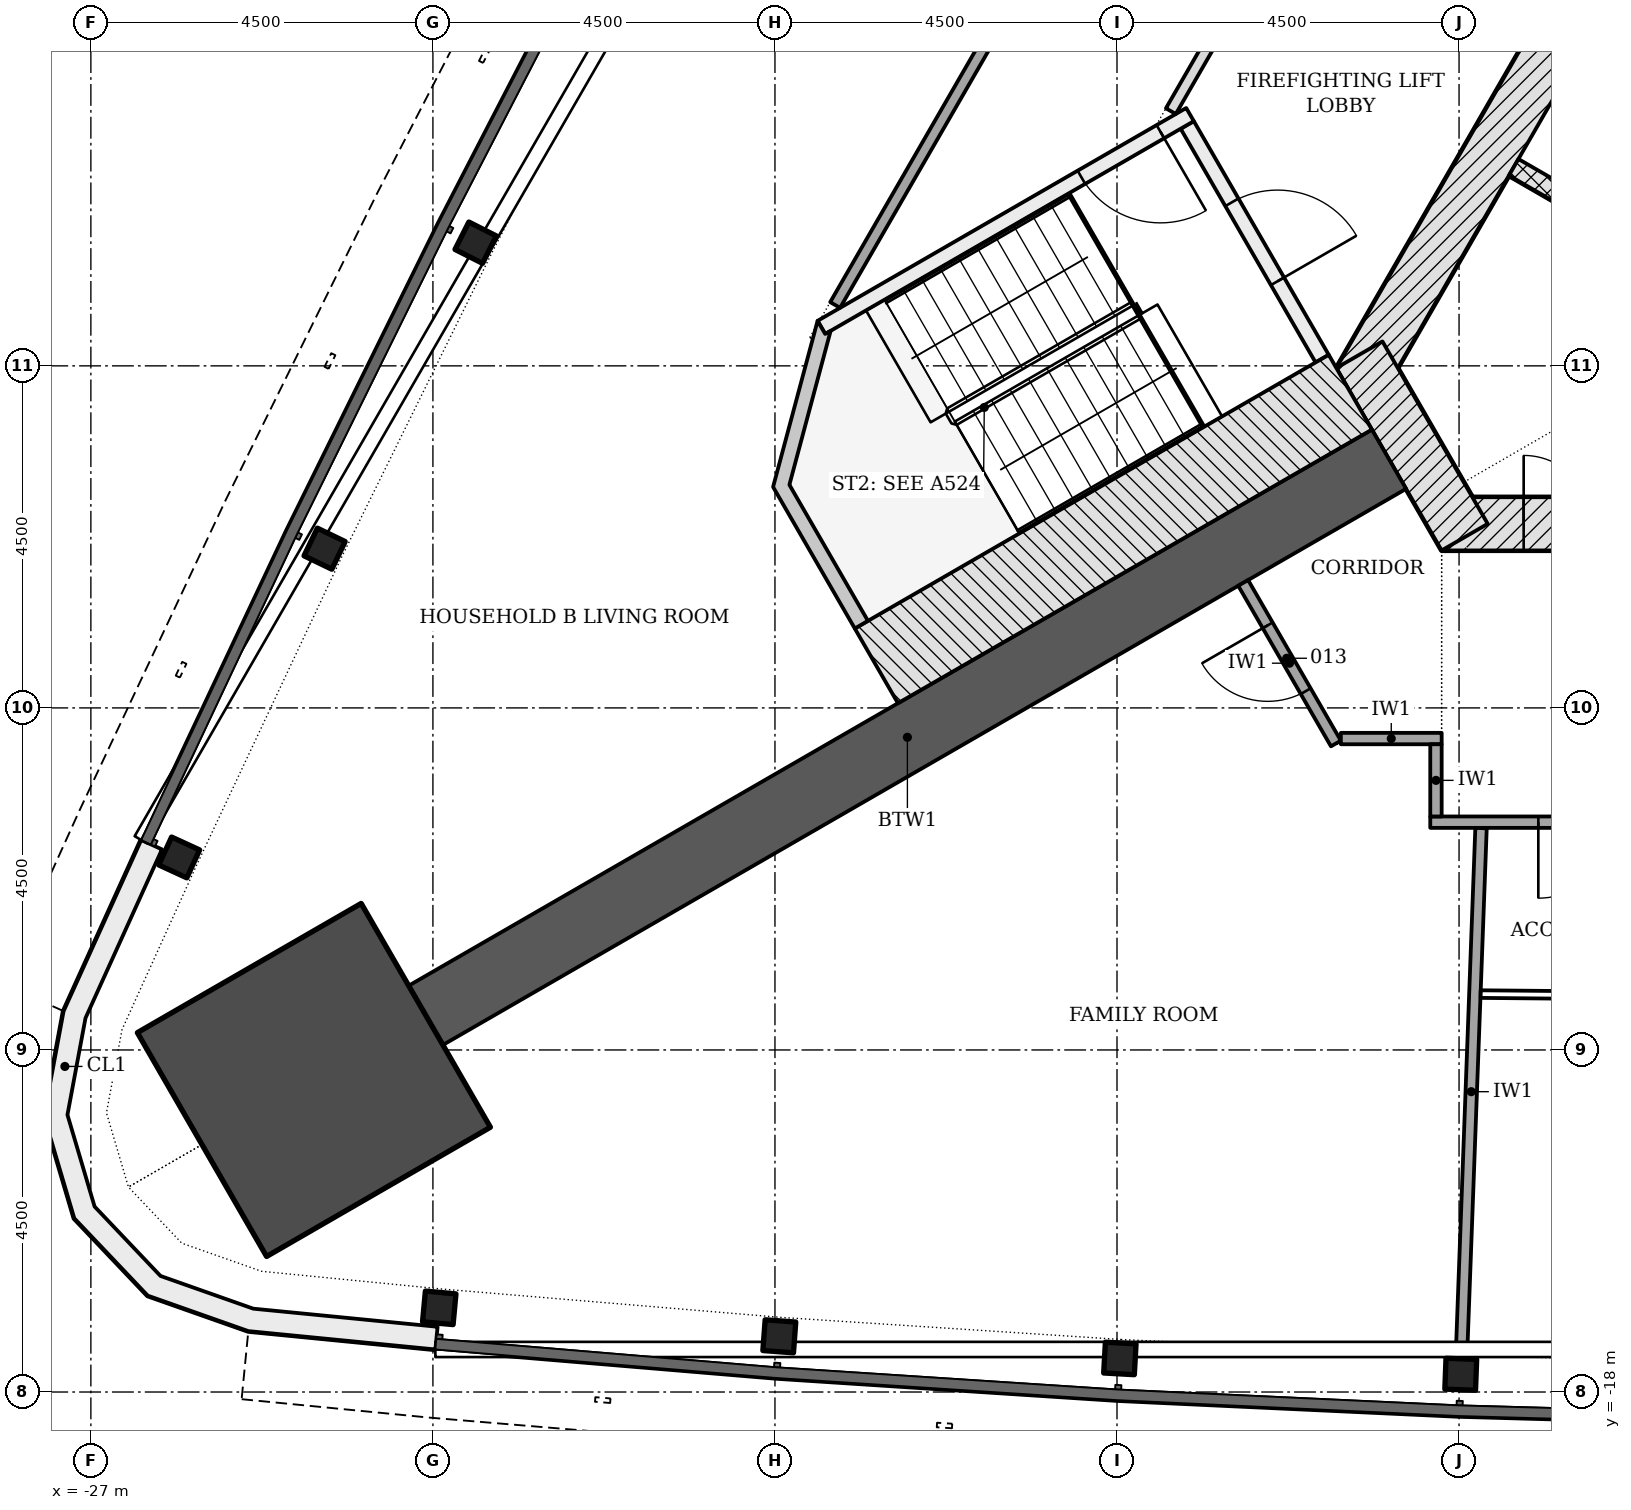
"""IFC4 building model, lengths in metres.
Left out: names, types, materials, properties, quantities, classifications, styles, units other than length and angle.
Written with IfcOpenShell. Run it as: python <this file> out.ifc"""

import sys

from ifc_helpers import new_model, si_unit, direction, frame, frame_2d, origin, origin_2d, place, context, subcontext, project, spatial, polyline, rectangle, i_section, outline, extrude, element, fill, save


model = new_model("IFC4")
c1 = context("Model", 3, precision=1e-05, world=origin(), true_north=direction((0.0, 1.0)))
c2 = subcontext(c1, "Body", "Model", "MODEL_VIEW")
j1 = project(units=[si_unit("LENGTHUNIT", "METRE"), si_unit("PLANEANGLEUNIT", "RADIAN")], contexts=[c1])
p1 = place(None, origin())
s1 = spatial("IfcSite", under=j1, at=p1, CompositionType="ELEMENT")
p2 = place(p1, origin())
s2 = spatial("IfcBuilding", under=s1, at=p2, CompositionType="ELEMENT")
p3 = place(p2, frame((0.0, 0.0, 27.6)))
s3 = spatial("IfcBuildingStorey", under=s2, at=p3, CompositionType="ELEMENT", Elevation=27.6)
p4 = place(p3, frame((-9.229, -6.578, -0.2), z_axis=(0.0, 0.0, 1.0), x_axis=(1.0, 0.0, 0.0)))
e1 = element("IfcWall", 1, at=p4, inside=s3, PredefinedType="SHEAR", context=c2, shape_type="SweptSolid", body=[
    extrude(rectangle(XDim=18.458, YDim=0.7, at=frame_2d((9.229, 0.0))), origin(), (0.0, 0.0, 1.0), 3.6),
])
p5 = place(p4, frame((3.304, 0.0, 0.2)))
e2 = element("IfcOpeningElement", 2, at=p5, cuts=e1, PredefinedType="OPENING", context=c2, shape_type="SweptSolid", body=[
    extrude(rectangle(XDim=1.1, YDim=2.1, at=frame_2d((0.55, 1.05))), frame((0.0, 0.36, 0.0), z_axis=(0.0, -1.0, 0.0), x_axis=(1.0, 0.0, 0.0)), (0.0, 0.0, 1.0), 0.72),
])
p6 = place(p4, frame((5.454, 0.0, 0.2)))
e3 = element("IfcOpeningElement", 3, at=p6, cuts=e1, PredefinedType="OPENING", context=c2, shape_type="SweptSolid", body=[
    extrude(rectangle(XDim=1.1, YDim=2.1, at=frame_2d((0.55, 1.05))), frame((0.0, 0.36, 0.0), z_axis=(0.0, -1.0, 0.0), x_axis=(1.0, 0.0, 0.0)), (0.0, 0.0, 1.0), 0.72),
])
p7 = place(p4, frame((7.604, 0.0, 0.2)))
e4 = element("IfcOpeningElement", 4, at=p7, cuts=e1, PredefinedType="OPENING", context=c2, shape_type="SweptSolid", body=[
    extrude(rectangle(XDim=1.1, YDim=2.1, at=frame_2d((0.55, 1.05))), frame((0.0, 0.36, 0.0), z_axis=(0.0, -1.0, 0.0), x_axis=(1.0, 0.0, 0.0)), (0.0, 0.0, 1.0), 0.72),
])
p8 = place(p4, frame((9.754, 0.0, 0.2)))
e5 = element("IfcOpeningElement", 5, at=p8, cuts=e1, PredefinedType="OPENING", context=c2, shape_type="SweptSolid", body=[
    extrude(rectangle(XDim=1.1, YDim=2.1, at=frame_2d((0.55, 1.05))), frame((0.0, 0.36, 0.0), z_axis=(0.0, -1.0, 0.0), x_axis=(1.0, 0.0, 0.0)), (0.0, 0.0, 1.0), 0.72),
])
p9 = place(p4, frame((11.904, 0.0, 0.2)))
e6 = element("IfcOpeningElement", 6, at=p9, cuts=e1, PredefinedType="OPENING", context=c2, shape_type="SweptSolid", body=[
    extrude(rectangle(XDim=1.1, YDim=2.1, at=frame_2d((0.55, 1.05))), frame((0.0, 0.36, 0.0), z_axis=(0.0, -1.0, 0.0), x_axis=(1.0, 0.0, 0.0)), (0.0, 0.0, 1.0), 0.72),
])
p10 = place(p4, frame((14.054, 0.0, 0.2)))
e7 = element("IfcOpeningElement", 7, at=p10, cuts=e1, PredefinedType="OPENING", context=c2, shape_type="SweptSolid", body=[
    extrude(rectangle(XDim=1.1, YDim=2.1, at=frame_2d((0.55, 1.05))), frame((0.0, 0.36, 0.0), z_axis=(0.0, -1.0, 0.0), x_axis=(1.0, 0.0, 0.0)), (0.0, 0.0, 1.0), 0.72),
])
p11 = place(p4, frame((1.079, 0.0, 0.2)))
e8 = element("IfcOpeningElement", 8, at=p11, cuts=e1, PredefinedType="OPENING", context=c2, shape_type="SweptSolid", body=[
    extrude(rectangle(XDim=0.9, YDim=2.1, at=frame_2d((0.45, 1.05))), frame((0.0, 0.36, 0.0), z_axis=(0.0, -1.0, 0.0), x_axis=(1.0, 0.0, 0.0)), (0.0, 0.0, 1.0), 0.72),
])
p12 = place(p3, frame((-1.083, 11.281, -0.2), z_axis=(0.0, 0.0, 1.0), x_axis=(-0.500001446645, -0.866024568562, 0.0)))
e9 = element("IfcWall", 9, at=p12, inside=s3, PredefinedType="SHEAR", context=c2, shape_type="SweptSolid", body=[
    extrude(rectangle(XDim=18.458, YDim=0.7, at=frame_2d((9.229, 0.0))), origin(), (0.0, 0.0, 1.0), 3.6),
])
p13 = place(p12, frame((8.979, 0.0, 0.2)))
e10 = element("IfcOpeningElement", 10, at=p13, cuts=e9, PredefinedType="OPENING", context=c2, shape_type="SweptSolid", body=[
    extrude(rectangle(XDim=1.2, YDim=2.1, at=frame_2d((0.6, 1.05))), frame((0.0, 0.36, 0.0), z_axis=(0.0, -1.0, 0.0), x_axis=(1.0, 0.0, 0.0)), (0.0, 0.0, 1.0), 0.72),
])
p14 = place(p12, frame((11.029, 0.0, 0.2)))
e11 = element("IfcOpeningElement", 11, at=p14, cuts=e9, PredefinedType="OPENING", context=c2, shape_type="SweptSolid", body=[
    extrude(rectangle(XDim=1.2, YDim=2.1, at=frame_2d((0.6, 1.05))), frame((0.0, 0.36, 0.0), z_axis=(0.0, -1.0, 0.0), x_axis=(1.0, 0.0, 0.0)), (0.0, 0.0, 1.0), 0.72),
])
p15 = place(p3, frame((-10.311, -4.353, -0.2), z_axis=(0.0, 0.0, 1.0), x_axis=(0.500042739161, -0.866000726912, 0.0)))
e12 = element("IfcWall", 12, at=p15, inside=s3, PredefinedType="SHEAR", context=c2, shape_type="SweptSolid", body=[
    extrude(rectangle(XDim=2.771, YDim=0.7, at=frame_2d((1.386, 0.0))), origin(), (0.0, 0.0, 1.0), 3.6),
])
p16 = place(p3, frame((-9.922, -5.728, -0.2), z_axis=(0.0, 0.0, 1.0), x_axis=(-0.866028046028, -0.499995423472, 0.0)))
e13 = element("IfcWall", 13, at=p16, inside=s3, PredefinedType="SHEAR", context=c2, shape_type="SweptSolid", body=[
    extrude(rectangle(XDim=14.633, YDim=0.9, at=frame_2d((7.316, 0.0))), origin(), (0.0, 0.0, 1.0), 3.6),
])
p17 = place(p3, frame((-24.066, -13.895, -0.2), z_axis=(0.0, 0.0, 1.0), x_axis=(-0.866025403784, -0.5, 0.0)))
e14 = element("IfcColumn", 14, at=p17, inside=s3, PredefinedType="COLUMN", context=c2, shape_type="SweptSolid", body=[
    extrude(rectangle(XDim=3.4, YDim=3.4, at=origin_2d()), origin(), (0.0, 0.0, 1.0), 3.6),
])
for number, where, z_axis, x_axis in (
    (15, (-21.937, -2.88, -0.2), (0.0, 0.0, 1.0), (-0.451, -0.893, 0.0)),
    (16, (-23.925, -6.905, -0.2), (0.0, 0.0, 1.0), (-0.434, -0.901, 0.0)),
    (17, (-25.838, -10.967, -0.2), (0.0, 0.0, 1.0), (-0.418, -0.909, 0.0)),
    (18, (-22.417, -16.893, -0.2), (0.0, 0.0, 1.0), (0.996, -0.093, 0.0)),
    (19, (-17.943, -17.267, -0.2), (0.0, 0.0, 1.0), (0.997, -0.074, 0.0)),
    (20, (-13.462, -17.558, -0.2), (0.0, 0.0, 1.0), (0.998, -0.056, 0.0)),
    (21, (-8.978, -17.767, -0.2), (0.0, 0.0, 1.0), (0.999, -0.037, 0.0)),
):
    element("IfcColumn", number, at=place(p3, frame(where, z_axis=z_axis, x_axis=x_axis)), inside=s3, PredefinedType="COLUMN", context=c2, shape_type="SweptSolid", body=[
        extrude(i_section(OverallWidth=0.404, OverallDepth=0.406, WebThickness=0.027, FlangeThickness=0.044, FilletRadius=0.015, at=origin_2d()), origin(), (0.0, 0.0, 1.0), 3.6),
    ])
p18 = place(p3, origin())
e22 = element("IfcWall", 22, at=p18, inside=s3, PredefinedType="NOTDEFINED", context=c2, shape_type="SweptSolid", body=[
    extrude(outline(polyline([(-26.338, -10.738), (-27.359, -12.99), (-27.616, -14.369), (-27.218, -15.715), (-26.252, -16.732), (-24.929, -17.199), (-22.468, -17.44), (-22.438, -17.142), (-24.863, -16.904), (-26.084, -16.473), (-26.951, -15.56), (-27.308, -14.353), (-27.071, -13.08), (-26.064, -10.861), (-26.338, -10.738)])), origin(), (0.0, 0.0, 1.0), 3.3),
])
p19 = place(p3, frame((-8.281, -1.887, -0.2), z_axis=(0.0, 0.0, 1.0), x_axis=(0.866032775405, -0.499987231761, 0.0)))
e23 = element("IfcWall", 23, at=p19, inside=s3, PredefinedType="PARTITIONING", context=c2, shape_type="SweptSolid", body=[
    extrude(rectangle(XDim=2.9, YDim=0.25, at=frame_2d((1.45, 0.0))), origin(), (0.0, 0.0, 1.0), 3.6),
])
p20 = place(p3, frame((-12.576, -1.331, -0.2), z_axis=(0.0, 0.0, 1.0), x_axis=(0.499970499736, -0.8660424351, 0.0)))
e24 = element("IfcWall", 24, at=p20, inside=s3, PredefinedType="SHEAR", context=c2, shape_type="SweptSolid", body=[
    extrude(rectangle(XDim=3.55, YDim=0.2, at=frame_2d((1.775, 0.0))), origin(), (0.0, 0.0, 1.0), 3.6),
])
p21 = place(p20, frame((1.175, 0.0, 0.2)))
e25 = element("IfcOpeningElement", 25, at=p21, cuts=e24, PredefinedType="OPENING", context=c2, shape_type="SweptSolid", body=[
    extrude(rectangle(XDim=1.2, YDim=2.1, at=frame_2d((0.6, 1.05))), frame((0.0, 0.11, 0.0), z_axis=(0.0, -1.0, 0.0), x_axis=(1.0, 0.0, 0.0)), (0.0, 0.0, 1.0), 0.22),
])
p22 = place(p3, frame((-12.539, -1.194, -0.2), z_axis=(0.0, 0.0, 1.0), x_axis=(-0.866045472092, -0.499965239061, 0.0)))
e26 = element("IfcWall", 26, at=p22, inside=s3, PredefinedType="SHEAR", context=c2, shape_type="SweptSolid", body=[
    extrude(rectangle(XDim=5.6, YDim=0.2, at=frame_2d((2.8, 0.0))), origin(), (0.0, 0.0, 1.0), 3.6),
])
p23 = place(p22, frame((0.45, 0.0, 0.2)))
e27 = element("IfcOpeningElement", 27, at=p23, cuts=e26, PredefinedType="OPENING", context=c2, shape_type="SweptSolid", body=[
    extrude(rectangle(XDim=1.2, YDim=2.1, at=frame_2d((0.6, 1.05))), frame((0.0, 0.11, 0.0), z_axis=(0.0, -1.0, 0.0), x_axis=(1.0, 0.0, 0.0)), (0.0, 0.0, 1.0), 0.22),
])
p24 = place(p3, frame((-10.43, -4.847, -0.2), z_axis=(0.0, 0.0, 1.0), x_axis=(-0.866018442252, -0.500012057535, 0.0)))
e28 = element("IfcWall", 28, at=p24, inside=s3, PredefinedType="SHEAR", context=c2, shape_type="SweptSolid", body=[
    extrude(rectangle(XDim=7.2, YDim=1.136, at=frame_2d((3.6, 0.0))), origin(), (0.0, 0.0, 1.0), 3.6),
])
p25 = place(p3, frame((0.0, 0.0, -0.2)))
e29 = element("IfcWall", 29, at=p25, inside=s3, PredefinedType="SHEAR", context=c2, shape_type="SweptSolid", body=[
    extrude(outline(polyline([(-17.439, -3.907), (-18.025, -6.093), (-16.95, -7.955), (-16.777, -7.855), (-17.81, -6.065), (-17.267, -4.039), (-17.339, -4.081), (-17.339, -4.081), (-17.339, -4.081), (-17.339, -4.081), (-17.339, -4.081), (-17.339, -4.081), (-17.339, -4.081), (-17.339, -4.081), (-17.339, -4.081), (-17.339, -4.081), (-17.339, -4.081), (-17.339, -4.081), (-17.339, -4.081), (-17.339, -4.081), (-17.339, -4.081), (-17.339, -4.081), (-17.339, -4.081), (-17.439, -3.907)])), origin(), (0.0, 0.0, 1.0), 3.6),
])
p26 = place(p3, frame((-17.208, -3.699, 0.0), z_axis=(0.0, 0.0, 1.0), x_axis=(0.499997567621, 0.866026808115, 0.0)))
e30 = element("IfcWall", 30, at=p26, inside=s3, PredefinedType="PARTITIONING", context=c2, shape_type="SweptSolid", body=[
    extrude(rectangle(XDim=23.736, YDim=0.15, at=frame_2d((11.868, 0.0))), origin(), (0.0, 0.0, 1.0), 2.768),
])
p27 = place(p26, frame((16.656, 0.0, 0.0)))
e31 = element("IfcOpeningElement", 31, at=p27, cuts=e30, PredefinedType="OPENING", context=c2, shape_type="SweptSolid", body=[
    extrude(rectangle(XDim=1.1, YDim=2.1, at=frame_2d((0.55, 1.05))), frame((0.0, 0.085, 0.0), z_axis=(0.0, -1.0, 0.0), x_axis=(1.0, 0.0, 0.0)), (0.0, 0.0, 1.0), 0.17),
])
p28 = place(p26, frame((14.662, 0.0, 0.0)))
e32 = element("IfcOpeningElement", 32, at=p28, cuts=e30, PredefinedType="OPENING", context=c2, shape_type="SweptSolid", body=[
    extrude(rectangle(XDim=1.1, YDim=2.1, at=frame_2d((0.55, 1.05))), frame((0.0, 0.085, 0.0), z_axis=(0.0, -1.0, 0.0), x_axis=(1.0, 0.0, 0.0)), (0.0, 0.0, 1.0), 0.17),
])
p29 = place(p26, frame((5.273, 0.0, 0.0)))
e33 = element("IfcOpeningElement", 33, at=p29, cuts=e30, PredefinedType="OPENING", context=c2, shape_type="SweptSolid", body=[
    extrude(rectangle(XDim=1.0, YDim=2.1, at=frame_2d((0.5, 1.05))), frame((0.0, 0.085, 0.0), z_axis=(0.0, -1.0, 0.0), x_axis=(1.0, 0.0, 0.0)), (0.0, 0.0, 1.0), 0.17),
])
p30 = place(p3, frame((-4.407, 13.374, 0.0), z_axis=(0.0, 0.0, 1.0), x_axis=(-0.499997181693, -0.866027030928, 0.0)))
e34 = element("IfcWall", 34, at=p30, inside=s3, PredefinedType="PARTITIONING", context=c2, shape_type="SweptSolid", body=[
    extrude(rectangle(XDim=16.77, YDim=0.15, at=frame_2d((8.385, 0.0))), origin(), (0.0, 0.0, 1.0), 2.768),
])
p31 = place(p30, frame((8.879, 0.0, 0.0)))
e35 = element("IfcOpeningElement", 35, at=p31, cuts=e34, PredefinedType="OPENING", context=c2, shape_type="SweptSolid", body=[
    extrude(rectangle(XDim=1.0, YDim=2.1, at=frame_2d((0.5, 1.05))), frame((0.0, 0.085, 0.0), z_axis=(0.0, -1.0, 0.0), x_axis=(1.0, 0.0, 0.0)), (0.0, 0.0, 1.0), 0.17),
])
p32 = place(p3, frame((3.689, -10.503, 0.0), z_axis=(0.0, 0.0, 1.0), x_axis=(-1.0, 0.0, 0.0)))
e36 = element("IfcWall", 36, at=p32, inside=s3, PredefinedType="PARTITIONING", context=c2, shape_type="SweptSolid", body=[
    extrude(rectangle(XDim=13.068, YDim=0.15, at=frame_2d((6.534, 0.0))), origin(), (0.0, 0.0, 1.0), 2.768),
])
p33 = place(p32, frame((10.646, 0.0, 0.0)))
e37 = element("IfcOpeningElement", 37, at=p33, cuts=e36, PredefinedType="OPENING", context=c2, shape_type="SweptSolid", body=[
    extrude(rectangle(XDim=1.0, YDim=2.1, at=frame_2d((0.5, 1.05))), frame((0.0, 0.085, 0.0), z_axis=(0.0, -1.0, 0.0), x_axis=(1.0, 0.0, 0.0)), (0.0, 0.0, 1.0), 0.17),
])
p34 = place(p32, frame((8.118, 0.0, 0.0)))
e38 = element("IfcOpeningElement", 38, at=p34, cuts=e36, PredefinedType="OPENING", context=c2, shape_type="SweptSolid", body=[
    extrude(rectangle(XDim=1.0, YDim=2.1, at=frame_2d((0.5, 1.05))), frame((0.0, 0.085, 0.0), z_axis=(0.0, -1.0, 0.0), x_axis=(1.0, 0.0, 0.0)), (0.0, 0.0, 1.0), 0.17),
])
p35 = place(p32, frame((2.986, 0.0, 0.0)))
e39 = element("IfcOpeningElement", 39, at=p35, cuts=e36, PredefinedType="OPENING", context=c2, shape_type="SweptSolid", body=[
    extrude(rectangle(XDim=1.5, YDim=2.1, at=frame_2d((0.75, 1.05))), frame((0.0, 0.085, 0.0), z_axis=(0.0, -1.0, 0.0), x_axis=(1.0, 0.0, 0.0)), (0.0, 0.0, 1.0), 0.17),
])
p36 = place(p3, frame((-10.62, -9.468, 0.0), z_axis=(0.0, 0.0, 1.0), x_axis=(-0.500045838785, 0.865998937132, 0.0)))
e40 = element("IfcWall", 40, at=p36, inside=s3, PredefinedType="PARTITIONING", context=c2, shape_type="SweptSolid", body=[
    extrude(rectangle(XDim=2.44, YDim=0.15, at=frame_2d((1.22, 0.0))), origin(), (0.0, 0.0, 1.0), 3.4),
])
p37 = place(p36, frame((0.795, 0.0, 0.0)))
e41 = element("IfcOpeningElement", 41, at=p37, cuts=e40, PredefinedType="OPENING", context=c2, shape_type="SweptSolid", body=[
    extrude(rectangle(XDim=1.0, YDim=2.1, at=frame_2d((0.5, 1.05))), frame((0.0, 0.085, 0.0), z_axis=(0.0, -1.0, 0.0), x_axis=(1.0, 0.0, 0.0)), (0.0, 0.0, 1.0), 0.17),
])
p38 = place(p3, frame((-10.555, -9.403, 0.0), z_axis=(0.0, 0.0, 1.0), x_axis=(1.0, 0.0, 0.0)))
e42 = element("IfcWall", 42, at=p38, inside=s3, PredefinedType="PARTITIONING", context=c2, shape_type="SweptSolid", body=[
    extrude(rectangle(XDim=1.326, YDim=0.15, at=frame_2d((0.663, 0.0))), origin(), (0.0, 0.0, 1.0), 3.4),
])
p39 = place(p3, frame((-9.304, -10.428, 0.0), z_axis=(0.0, 0.0, 1.0), x_axis=(0.0, 1.0, 0.0)))
e43 = element("IfcWall", 43, at=p39, inside=s3, PredefinedType="PARTITIONING", context=c2, shape_type="SweptSolid", body=[
    extrude(rectangle(XDim=0.95, YDim=0.15, at=frame_2d((0.475, 0.0))), origin(), (0.0, 0.0, 1.0), 3.4),
])
p40 = place(p3, frame((-8.968, -17.517, 0.0), z_axis=(0.0, 0.0, 1.0), x_axis=(0.037111842783, 0.999311118284, 0.0)))
e44 = element("IfcWall", 44, at=p40, inside=s3, PredefinedType="PARTITIONING", context=c2, shape_type="SweptSolid", body=[
    extrude(rectangle(XDim=6.94, YDim=0.15, at=frame_2d((3.47, 0.0))), origin(), (0.0, 0.0, 1.0), 2.768),
])
p41 = place(p3, frame((-8.715, -12.765, 0.0), z_axis=(0.0, 0.0, 1.0), x_axis=(0.999957193633, -0.00925261596, 0.0)))
e45 = element("IfcWall", 45, at=p41, inside=s3, PredefinedType="PARTITIONING", context=c2, shape_type="SweptSolid", body=[
    extrude(rectangle(XDim=5.066, YDim=0.1, at=frame_2d((2.533, 0.0))), origin(), (0.0, 0.0, 1.0), 2.768),
])
p42 = place(p11, origin())
e46 = element("IfcDoor", 46, at=p42, inside=s3, OperationType="SINGLE_SWING_LEFT", PredefinedType="DOOR", context=c2, shape_type="SweptSolid", body=[
    extrude(rectangle(XDim=0.9, YDim=2.1, at=frame_2d((0.45, 1.05))), frame((0.0, 0.075, 0.0), z_axis=(0.0, -1.0, 0.0), x_axis=(1.0, 0.0, 0.0)), (0.0, 0.0, 1.0), 0.15),
])
fill(e8, e46)
p43 = place(p21, origin())
e47 = element("IfcDoor", 47, at=p43, inside=s3, OperationType="SINGLE_SWING_RIGHT", PredefinedType="DOOR", context=c2, shape_type="SweptSolid", body=[
    extrude(rectangle(XDim=1.2, YDim=2.1, at=frame_2d((0.6, 1.05))), frame((0.0, 0.025, 0.0), z_axis=(0.0, -1.0, 0.0), x_axis=(1.0, 0.0, 0.0)), (0.0, 0.0, 1.0), 0.05),
])
fill(e25, e47)
p44 = place(p23, origin())
e48 = element("IfcDoor", 48, at=p44, inside=s3, OperationType="SINGLE_SWING_LEFT", PredefinedType="DOOR", context=c2, shape_type="SweptSolid", body=[
    extrude(rectangle(XDim=1.2, YDim=2.1, at=frame_2d((0.6, 1.05))), frame((0.0, 0.025, 0.0), z_axis=(0.0, -1.0, 0.0), x_axis=(1.0, 0.0, 0.0)), (0.0, 0.0, 1.0), 0.05),
])
fill(e27, e48)
p45 = place(p33, origin())
e49 = element("IfcDoor", 49, at=p45, inside=s3, OperationType="SINGLE_SWING_RIGHT", PredefinedType="DOOR", context=c2, shape_type="SweptSolid", body=[
    extrude(rectangle(XDim=1.0, YDim=2.1, at=frame_2d((0.5, 1.05))), frame((0.0, 0.025, 0.0), z_axis=(0.0, -1.0, 0.0), x_axis=(1.0, 0.0, 0.0)), (0.0, 0.0, 1.0), 0.05),
])
fill(e37, e49)
p46 = place(p37, origin())
e50 = element("IfcDoor", 50, at=p46, inside=s3, OperationType="SINGLE_SWING_RIGHT", PredefinedType="DOOR", context=c2, shape_type="SweptSolid", body=[
    extrude(rectangle(XDim=1.0, YDim=2.1, at=frame_2d((0.5, 1.05))), frame((0.0, 0.025, 0.0), z_axis=(0.0, -1.0, 0.0), x_axis=(1.0, 0.0, 0.0)), (0.0, 0.0, 1.0), 0.05),
])
fill(e41, e50)
save(model, sys.argv[1])
